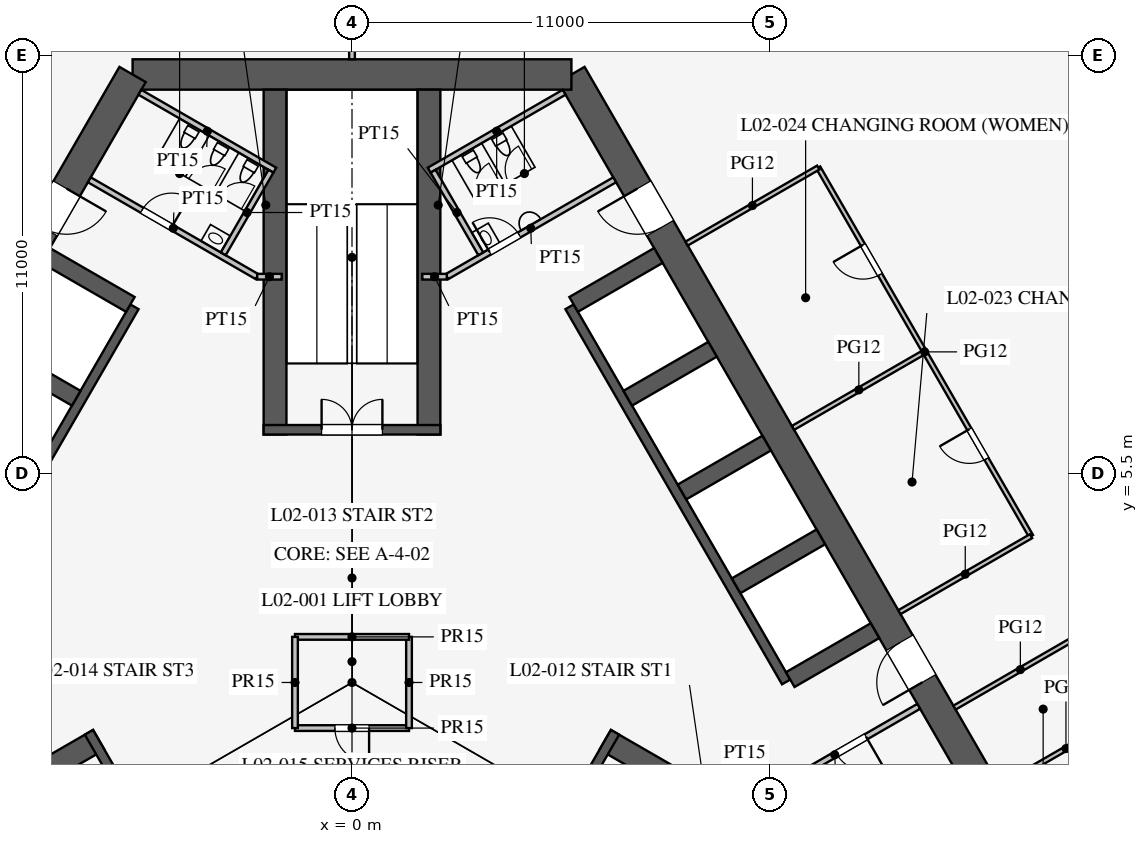
"""IFC4 building model, lengths in metres.
Left out: names, types, materials, properties, quantities, classifications, styles, units other than length and angle.
Written with IfcOpenShell. Run it as: python <this file> out.ifc"""

import sys

from ifc_helpers import new_model, si_unit, direction, frame, frame_2d, origin, place, context, subcontext, project, spatial, rectangle, extrude, element, fill, save


model = new_model("IFC4")
c1 = context("Model", 3, precision=1e-05, world=origin(), true_north=direction((0.0, 1.0)))
c2 = subcontext(c1, "Body", "Model", "MODEL_VIEW")
j1 = project(units=[si_unit("LENGTHUNIT", "METRE"), si_unit("PLANEANGLEUNIT", "RADIAN")], contexts=[c1])
p1 = place(None, origin())
s1 = spatial("IfcSite", under=j1, at=p1, CompositionType="ELEMENT")
p2 = place(p1, origin())
s2 = spatial("IfcBuilding", under=s1, at=p2, CompositionType="ELEMENT")
p3 = place(p2, frame((0.0, 0.0, 11.5)))
s3 = spatial("IfcBuildingStorey", under=s2, at=p3, CompositionType="ELEMENT", Elevation=11.5)
p4 = place(p3, frame((16.743, -3.0, 0.0), z_axis=(0.0, 0.0, 1.0), x_axis=(-0.500002442456, 0.866023993627, 0.0)))
e1 = element("IfcWall", 1, at=p4, inside=s3, PredefinedType="SHEAR", context=c2, shape_type="SweptSolid", body=[
    extrude(rectangle(XDim=21.939, YDim=0.8, at=frame_2d((10.97, 0.0))), origin(), (0.0, 0.0, 1.0), 5.0),
])
p5 = place(p4, frame((17.27, 0.0, 0.0)))
e2 = element("IfcOpeningElement", 2, at=p5, cuts=e1, PredefinedType="OPENING", context=c2, shape_type="SweptSolid", body=[
    extrude(rectangle(XDim=1.2, YDim=2.1, at=frame_2d((0.6, 1.05))), frame((0.0, 0.41, 0.0), z_axis=(0.0, -1.0, 0.0), x_axis=(1.0, 0.0, 0.0)), (0.0, 0.0, 1.0), 0.82),
])
p6 = place(p4, frame((3.47, 0.0, 0.0)))
e3 = element("IfcOpeningElement", 3, at=p6, cuts=e1, PredefinedType="OPENING", context=c2, shape_type="SweptSolid", body=[
    extrude(rectangle(XDim=1.2, YDim=2.1, at=frame_2d((0.6, 1.05))), frame((0.0, 0.41, 0.0), z_axis=(0.0, -1.0, 0.0), x_axis=(1.0, 0.0, 0.0)), (0.0, 0.0, 1.0), 0.82),
])
p7 = place(p3, frame((5.773, 16.0, 0.0), z_axis=(0.0, 0.0, 1.0), x_axis=(-1.0, 0.0, 0.0)))
e4 = element("IfcWall", 4, at=p7, inside=s3, PredefinedType="SHEAR", context=c2, shape_type="SweptSolid", body=[
    extrude(rectangle(XDim=11.547, YDim=0.8, at=frame_2d((5.773, 0.0))), origin(), (0.0, 0.0, 1.0), 5.0),
])
p8 = place(p3, frame((-5.773, 16.0, 0.0), z_axis=(0.0, 0.0, 1.0), x_axis=(-0.500002442456, -0.866023993627, 0.0)))
e5 = element("IfcWall", 5, at=p8, inside=s3, PredefinedType="SHEAR", context=c2, shape_type="SweptSolid", body=[
    extrude(rectangle(XDim=21.939, YDim=0.8, at=frame_2d((10.97, 0.0))), origin(), (0.0, 0.0, 1.0), 5.0),
])
p9 = place(p8, frame((17.27, 0.0, 0.0)))
e6 = element("IfcOpeningElement", 6, at=p9, cuts=e5, PredefinedType="OPENING", context=c2, shape_type="SweptSolid", body=[
    extrude(rectangle(XDim=1.2, YDim=2.1, at=frame_2d((0.6, 1.05))), frame((0.0, 0.41, 0.0), z_axis=(0.0, -1.0, 0.0), x_axis=(1.0, 0.0, 0.0)), (0.0, 0.0, 1.0), 0.82),
])
p10 = place(p8, frame((3.47, 0.0, 0.0)))
e7 = element("IfcOpeningElement", 7, at=p10, cuts=e5, PredefinedType="OPENING", context=c2, shape_type="SweptSolid", body=[
    extrude(rectangle(XDim=1.2, YDim=2.1, at=frame_2d((0.6, 1.05))), frame((0.0, 0.41, 0.0), z_axis=(0.0, -1.0, 0.0), x_axis=(1.0, 0.0, 0.0)), (0.0, 0.0, 1.0), 0.82),
])
p11 = place(p3, frame((11.424, 0.014, 0.0), z_axis=(0.0, 0.0, 1.0), x_axis=(-0.500001763848, 0.866024385424, 0.0)))
e8 = element("IfcWall", 8, at=p11, inside=s3, PredefinedType="SHEAR", context=c2, shape_type="SweptSolid", body=[
    extrude(rectangle(XDim=11.4, YDim=0.25, at=frame_2d((5.7, 0.0))), origin(), (0.0, 0.0, 1.0), 5.0),
])
for number, where, z_axis, x_axis in (
    (9, (11.532, 0.076, 0.0), (0.0, 0.0, 1.0), (0.866, 0.5, 0.0)),
    (10, (10.107, 2.544, 0.0), (0.0, 0.0, 1.0), (0.866, 0.5, 0.0)),
    (11, (8.682, 5.012, 0.0), (0.0, 0.0, 1.0), (0.866, 0.5, 0.0)),
    (12, (7.257, 7.481, 0.0), (0.0, 0.0, 1.0), (0.866, 0.5, 0.0)),
):
    element("IfcWall", number, at=place(p3, frame(where, z_axis=z_axis, x_axis=x_axis)), inside=s3, PredefinedType="SHEAR", context=c2, shape_type="SweptSolid", body=[
        extrude(rectangle(XDim=2.575, YDim=0.45, at=frame_2d((1.288, 0.0))), origin(), (0.0, 0.0, 1.0), 5.0),
    ])
p12 = place(p3, frame((5.832, 9.949, 0.0), z_axis=(0.0, 0.0, 1.0), x_axis=(0.866029291668, 0.499993265928, 0.0)))
e13 = element("IfcWall", 13, at=p12, inside=s3, PredefinedType="SHEAR", context=c2, shape_type="SweptSolid", body=[
    extrude(rectangle(XDim=2.575, YDim=0.45, at=frame_2d((1.288, 0.0))), origin(), (0.0, 0.0, 1.0), 5.0),
])
p13 = place(p3, frame((-5.724, 9.886, 0.0), z_axis=(0.0, 0.0, 1.0), x_axis=(-0.500001763848, -0.866024385424, 0.0)))
e14 = element("IfcWall", 14, at=p13, inside=s3, PredefinedType="SHEAR", context=c2, shape_type="SweptSolid", body=[
    extrude(rectangle(XDim=11.4, YDim=0.25, at=frame_2d((5.7, 0.0))), origin(), (0.0, 0.0, 1.0), 5.0),
])
p14 = place(p13, frame((6.525, 0.0, 0.0)))
e15 = element("IfcOpeningElement", 15, at=p14, cuts=e14, PredefinedType="OPENING", context=c2, shape_type="SweptSolid", body=[
    extrude(rectangle(XDim=1.2, YDim=2.2, at=frame_2d((0.6, 1.1))), frame((0.0, 0.135, 0.0), z_axis=(0.0, -1.0, 0.0), x_axis=(1.0, 0.0, 0.0)), (0.0, 0.0, 1.0), 0.27),
])
p15 = place(p13, frame((9.375, 0.0, 0.0)))
e16 = element("IfcOpeningElement", 16, at=p15, cuts=e14, PredefinedType="OPENING", context=c2, shape_type="SweptSolid", body=[
    extrude(rectangle(XDim=1.2, YDim=2.2, at=frame_2d((0.6, 1.1))), frame((0.0, 0.135, 0.0), z_axis=(0.0, -1.0, 0.0), x_axis=(1.0, 0.0, 0.0)), (0.0, 0.0, 1.0), 0.27),
])
p16 = place(p3, frame((-5.832, 9.949, 0.0), z_axis=(0.0, 0.0, 1.0), x_axis=(-0.866029291668, 0.499993265928, 0.0)))
e17 = element("IfcWall", 17, at=p16, inside=s3, PredefinedType="SHEAR", context=c2, shape_type="SweptSolid", body=[
    extrude(rectangle(XDim=2.575, YDim=0.45, at=frame_2d((1.288, 0.0))), origin(), (0.0, 0.0, 1.0), 5.0),
])
p17 = place(p3, frame((-7.257, 7.481, 0.0), z_axis=(0.0, 0.0, 1.0), x_axis=(-0.866046643894, 0.499963209246, 0.0)))
e18 = element("IfcWall", 18, at=p17, inside=s3, PredefinedType="SHEAR", context=c2, shape_type="SweptSolid", body=[
    extrude(rectangle(XDim=2.575, YDim=0.45, at=frame_2d((1.288, 0.0))), origin(), (0.0, 0.0, 1.0), 5.0),
])
p18 = place(p3, frame((6.663, -1.509, 0.0), z_axis=(0.0, 0.0, 1.0), x_axis=(0.866019375473, -0.500010441196, 0.0)))
e19 = element("IfcWall", 19, at=p18, inside=s3, PredefinedType="SHEAR", context=c2, shape_type="SweptSolid", body=[
    extrude(rectangle(XDim=9.075, YDim=0.6, at=frame_2d((4.538, 0.0))), origin(), (0.0, 0.0, 1.0), 5.0),
])
p19 = place(p3, frame((4.597, -5.339, 0.0), z_axis=(0.0, 0.0, 1.0), x_axis=(0.499984536904, 0.866034331223, 0.0)))
e20 = element("IfcWall", 20, at=p19, inside=s3, PredefinedType="SHEAR", context=c2, shape_type="SweptSolid", body=[
    extrude(rectangle(XDim=4.65, YDim=0.25, at=frame_2d((2.325, 0.0))), origin(), (0.0, 0.0, 1.0), 5.0),
])
p20 = place(p19, frame((1.525, 0.0, 0.0)))
e21 = element("IfcOpeningElement", 21, at=p20, cuts=e20, PredefinedType="OPENING", context=c2, shape_type="SweptSolid", body=[
    extrude(rectangle(XDim=1.6, YDim=2.1, at=frame_2d((0.8, 1.05))), frame((0.0, 0.135, 0.0), z_axis=(0.0, -1.0, 0.0), x_axis=(1.0, 0.0, 0.0)), (0.0, 0.0, 1.0), 0.27),
])
for number, where, z_axis, x_axis in (
    (22, (2.025, 6.525, 0.0), (0.0, 0.0, 1.0), (0.0, 1.0, 0.0)),
    (23, (-2.025, 6.525, 0.0), (0.0, 0.0, 1.0), (0.0, 1.0, 0.0)),
):
    element("IfcWall", number, at=place(p3, frame(where, z_axis=z_axis, x_axis=x_axis)), inside=s3, PredefinedType="SHEAR", context=c2, shape_type="SweptSolid", body=[
        extrude(rectangle(XDim=9.075, YDim=0.6, at=frame_2d((4.538, 0.0))), origin(), (0.0, 0.0, 1.0), 5.0),
    ])
p21 = place(p3, frame((2.325, 6.65, 0.0), z_axis=(0.0, 0.0, 1.0), x_axis=(-1.0, 0.0, 0.0)))
e24 = element("IfcWall", 24, at=p21, inside=s3, PredefinedType="SHEAR", context=c2, shape_type="SweptSolid", body=[
    extrude(rectangle(XDim=4.65, YDim=0.25, at=frame_2d((2.325, 0.0))), origin(), (0.0, 0.0, 1.0), 5.0),
])
p22 = place(p21, frame((1.525, 0.0, 0.0)))
e25 = element("IfcOpeningElement", 25, at=p22, cuts=e24, PredefinedType="OPENING", context=c2, shape_type="SweptSolid", body=[
    extrude(rectangle(XDim=1.6, YDim=2.1, at=frame_2d((0.8, 1.05))), frame((0.0, 0.135, 0.0), z_axis=(0.0, -1.0, 0.0), x_axis=(1.0, 0.0, 0.0)), (0.0, 0.0, 1.0), 0.27),
])
p23 = place(p3, frame((-6.663, -1.509, 0.0), z_axis=(0.0, 0.0, 1.0), x_axis=(-0.866019375473, -0.500010441196, 0.0)))
e26 = element("IfcWall", 26, at=p23, inside=s3, PredefinedType="SHEAR", context=c2, shape_type="SweptSolid", body=[
    extrude(rectangle(XDim=9.075, YDim=0.6, at=frame_2d((4.538, 0.0))), origin(), (0.0, 0.0, 1.0), 5.0),
])
p24 = place(p3, frame((-6.922, -1.312, 0.0), z_axis=(0.0, 0.0, 1.0), x_axis=(0.499984536904, -0.866034331223, 0.0)))
e27 = element("IfcWall", 27, at=p24, inside=s3, PredefinedType="SHEAR", context=c2, shape_type="SweptSolid", body=[
    extrude(rectangle(XDim=4.65, YDim=0.25, at=frame_2d((2.325, 0.0))), origin(), (0.0, 0.0, 1.0), 5.0),
])
p25 = place(p24, frame((1.525, 0.0, 0.0)))
e28 = element("IfcOpeningElement", 28, at=p25, cuts=e27, PredefinedType="OPENING", context=c2, shape_type="SweptSolid", body=[
    extrude(rectangle(XDim=1.6, YDim=2.1, at=frame_2d((0.8, 1.05))), frame((0.0, 0.135, 0.0), z_axis=(0.0, -1.0, 0.0), x_axis=(1.0, 0.0, 0.0)), (0.0, 0.0, 1.0), 0.27),
])
p26 = place(p3, frame((2.495, 10.678, 0.0), z_axis=(0.0, 0.0, 1.0), x_axis=(0.86602216432, 0.500005610874, 0.0)))
e29 = element("IfcWall", 29, at=p26, inside=s3, PredefinedType="PARTITIONING", context=c2, shape_type="SweptSolid", body=[
    extrude(rectangle(XDim=5.1, YDim=0.15, at=frame_2d((2.55, 0.0))), origin(), (0.0, 0.0, 1.0), 4.8),
])
p27 = place(p26, frame((1.3, 0.0, 0.0)))
e30 = element("IfcOpeningElement", 30, at=p27, cuts=e29, PredefinedType="OPENING", context=c2, shape_type="SweptSolid", body=[
    extrude(rectangle(XDim=0.9, YDim=2.1, at=frame_2d((0.45, 1.05))), frame((0.0, 0.085, 0.0), z_axis=(0.0, -1.0, 0.0), x_axis=(1.0, 0.0, 0.0)), (0.0, 0.0, 1.0), 0.17),
])
p28 = place(p3, frame((10.495, -3.178, 0.0), z_axis=(0.0, 0.0, 1.0), x_axis=(0.86602216432, 0.500005610874, 0.0)))
e31 = element("IfcWall", 31, at=p28, inside=s3, PredefinedType="PARTITIONING", context=c2, shape_type="SweptSolid", body=[
    extrude(rectangle(XDim=5.1, YDim=0.15, at=frame_2d((2.55, 0.0))), origin(), (0.0, 0.0, 1.0), 4.8),
])
p29 = place(p28, frame((2.6, 0.0, 0.0)))
e32 = element("IfcOpeningElement", 32, at=p29, cuts=e31, PredefinedType="OPENING", context=c2, shape_type="SweptSolid", body=[
    extrude(rectangle(XDim=0.9, YDim=2.1, at=frame_2d((0.45, 1.05))), frame((0.0, 0.085, 0.0), z_axis=(0.0, -1.0, 0.0), x_axis=(1.0, 0.0, 0.0)), (0.0, 0.0, 1.0), 0.17),
])
p30 = place(p3, frame((-2.495, 10.678, 0.0), z_axis=(0.0, 0.0, 1.0), x_axis=(-0.86602216432, 0.500005610874, 0.0)))
e33 = element("IfcWall", 33, at=p30, inside=s3, PredefinedType="PARTITIONING", context=c2, shape_type="SweptSolid", body=[
    extrude(rectangle(XDim=5.1, YDim=0.15, at=frame_2d((2.55, 0.0))), origin(), (0.0, 0.0, 1.0), 4.8),
])
p31 = place(p30, frame((2.6, 0.0, 0.0)))
e34 = element("IfcOpeningElement", 34, at=p31, cuts=e33, PredefinedType="OPENING", context=c2, shape_type="SweptSolid", body=[
    extrude(rectangle(XDim=0.9, YDim=2.1, at=frame_2d((0.45, 1.05))), frame((0.0, 0.085, 0.0), z_axis=(0.0, -1.0, 0.0), x_axis=(1.0, 0.0, 0.0)), (0.0, 0.0, 1.0), 0.17),
])
for number, where, z_axis, x_axis in (
    (35, (2.495, 10.678, 0.0), (0.0, 0.0, 1.0), (-1.0, 0.0, 0.0)),
    (36, (-2.495, 10.678, 0.0), (0.0, 0.0, 1.0), (1.0, 0.0, 0.0)),
):
    element("IfcWall", number, at=place(p3, frame(where, z_axis=z_axis, x_axis=x_axis)), inside=s3, PredefinedType="PARTITIONING", context=c2, shape_type="SweptSolid", body=[
        extrude(rectangle(XDim=0.645, YDim=0.15, at=frame_2d((0.323, 0.0))), origin(), (0.0, 0.0, 1.0), 4.8),
    ])
p32 = place(p3, frame((2.031, 13.482, 0.0), z_axis=(0.0, 0.0, 1.0), x_axis=(0.866050731258, 0.499956128963, 0.0)))
e37 = element("IfcWall", 37, at=p32, inside=s3, PredefinedType="PARTITIONING", context=c2, shape_type="SweptSolid", body=[
    extrude(rectangle(XDim=4.1, YDim=0.15, at=frame_2d((2.05, 0.0))), origin(), (0.0, 0.0, 1.0), 4.8),
])
p33 = place(p3, frame((3.389, 11.281, 0.0), z_axis=(0.0, 0.0, 1.0), x_axis=(-0.499989096993, 0.866031698547, 0.0)))
e38 = element("IfcWall", 38, at=p33, inside=s3, PredefinedType="PARTITIONING", context=c2, shape_type="SweptSolid", body=[
    extrude(rectangle(XDim=2.51, YDim=0.15, at=frame_2d((1.255, 0.0))), origin(), (0.0, 0.0, 1.0), 4.8),
])
p34 = place(p3, frame((-2.031, 13.482, 0.0), z_axis=(0.0, 0.0, 1.0), x_axis=(-0.866050731258, 0.499956128963, 0.0)))
e39 = element("IfcWall", 39, at=p34, inside=s3, PredefinedType="PARTITIONING", context=c2, shape_type="SweptSolid", body=[
    extrude(rectangle(XDim=4.1, YDim=0.15, at=frame_2d((2.05, 0.0))), origin(), (0.0, 0.0, 1.0), 4.8),
])
p35 = place(p3, frame((-3.389, 11.281, 0.0), z_axis=(0.0, 0.0, 1.0), x_axis=(0.499989096993, 0.866031698547, 0.0)))
e40 = element("IfcWall", 40, at=p35, inside=s3, PredefinedType="PARTITIONING", context=c2, shape_type="SweptSolid", body=[
    extrude(rectangle(XDim=2.51, YDim=0.15, at=frame_2d((1.255, 0.0))), origin(), (0.0, 0.0, 1.0), 4.8),
])
p36 = place(p3, frame((-1.5, -1.2, 0.0), z_axis=(0.0, 0.0, 1.0), x_axis=(1.0, 0.0, 0.0)))
e41 = element("IfcWall", 41, at=p36, inside=s3, PredefinedType="PARTITIONING", context=c2, shape_type="SweptSolid", body=[
    extrude(rectangle(XDim=3.0, YDim=0.15, at=frame_2d((1.5, 0.0))), origin(), (0.0, 0.0, 1.0), 4.8),
])
p37 = place(p36, frame((1.05, 0.0, 0.0)))
e42 = element("IfcOpeningElement", 42, at=p37, cuts=e41, PredefinedType="OPENING", context=c2, shape_type="SweptSolid", body=[
    extrude(rectangle(XDim=0.9, YDim=2.1, at=frame_2d((0.45, 1.05))), frame((0.0, 0.085, 0.0), z_axis=(0.0, -1.0, 0.0), x_axis=(1.0, 0.0, 0.0)), (0.0, 0.0, 1.0), 0.17),
])
p38 = place(p3, frame((1.5, -1.2, 0.0), z_axis=(0.0, 0.0, 1.0), x_axis=(0.0, 1.0, 0.0)))
e43 = element("IfcWall", 43, at=p38, inside=s3, PredefinedType="PARTITIONING", context=c2, shape_type="SweptSolid", body=[
    extrude(rectangle(XDim=2.4, YDim=0.15, at=frame_2d((1.2, 0.0))), origin(), (0.0, 0.0, 1.0), 4.8),
])
p39 = place(p3, frame((1.5, 1.2, 0.0), z_axis=(0.0, 0.0, 1.0), x_axis=(-1.0, 0.0, 0.0)))
e44 = element("IfcWall", 44, at=p39, inside=s3, PredefinedType="PARTITIONING", context=c2, shape_type="SweptSolid", body=[
    extrude(rectangle(XDim=3.0, YDim=0.15, at=frame_2d((1.5, 0.0))), origin(), (0.0, 0.0, 1.0), 4.8),
])
p40 = place(p3, frame((-1.5, 1.2, 0.0), z_axis=(0.0, 0.0, 1.0), x_axis=(0.0, -1.0, 0.0)))
e45 = element("IfcWall", 45, at=p40, inside=s3, PredefinedType="PARTITIONING", context=c2, shape_type="SweptSolid", body=[
    extrude(rectangle(XDim=2.4, YDim=0.15, at=frame_2d((1.2, 0.0))), origin(), (0.0, 0.0, 1.0), 4.8),
])
p41 = place(p3, frame((0.0, 16.4, 0.0), z_axis=(0.0, 0.0, 1.0), x_axis=(0.0, 1.0, 0.0)))
e46 = element("IfcWall", 46, at=p41, inside=s3, PredefinedType="PARTITIONING", context=c2, shape_type="SweptSolid", body=[
    extrude(rectangle(XDim=18.25, YDim=0.15, at=frame_2d((9.125, 0.0))), origin(), (0.0, 0.0, 1.0), 3.1),
])
p42 = place(p3, frame((15.069, 8.7, 0.0), z_axis=(0.0, 0.0, 1.0), x_axis=(-0.49999793692, 0.866026594901, 0.0)))
e47 = element("IfcWall", 47, at=p42, inside=s3, PredefinedType="PARTITIONING", context=c2, shape_type="SweptSolid", body=[
    extrude(rectangle(XDim=5.6, YDim=0.12, at=frame_2d((2.8, 0.0))), origin(), (0.0, 0.0, 1.0), 3.6),
])
p43 = place(p42, frame((2.35, 0.0, 0.0)))
e48 = element("IfcOpeningElement", 48, at=p43, cuts=e47, PredefinedType="OPENING", context=c2, shape_type="SweptSolid", body=[
    extrude(rectangle(XDim=0.9, YDim=2.1, at=frame_2d((0.45, 1.05))), frame((0.0, 0.07, 0.0), z_axis=(0.0, -1.0, 0.0), x_axis=(1.0, 0.0, 0.0)), (0.0, 0.0, 1.0), 0.14),
])
p44 = place(p3, frame((17.869, 3.85, 0.0), z_axis=(0.0, 0.0, 1.0), x_axis=(-0.500016814911, 0.866015695474, 0.0)))
e49 = element("IfcWall", 49, at=p44, inside=s3, PredefinedType="PARTITIONING", context=c2, shape_type="SweptSolid", body=[
    extrude(rectangle(XDim=5.6, YDim=0.12, at=frame_2d((2.8, 0.0))), origin(), (0.0, 0.0, 1.0), 3.6),
])
p45 = place(p44, frame((2.35, 0.0, 0.0)))
e50 = element("IfcOpeningElement", 50, at=p45, cuts=e49, PredefinedType="OPENING", context=c2, shape_type="SweptSolid", body=[
    extrude(rectangle(XDim=0.9, YDim=2.1, at=frame_2d((0.45, 1.05))), frame((0.0, 0.07, 0.0), z_axis=(0.0, -1.0, 0.0), x_axis=(1.0, 0.0, 0.0)), (0.0, 0.0, 1.0), 0.14),
])
for number, where, z_axis, x_axis in (
    (51, (8.805, 11.55, 0.0), (0.0, 0.0, 1.0), (0.866, 0.5, 0.0)),
    (52, (11.605, 6.7, 0.0), (0.0, 0.0, 1.0), (0.866, 0.5, 0.0)),
    (53, (17.055, -2.74, 0.0), (0.0, 0.0, 1.0), (0.866, 0.5, 0.0)),
    (54, (14.405, 1.85, 0.0), (0.0, 0.0, 1.0), (0.866, 0.5, 0.0)),
    (55, (15.855, -0.661, 0.0), (0.0, 0.0, 1.0), (0.866, 0.5, 0.0)),
):
    element("IfcWall", number, at=place(p3, frame(where, z_axis=z_axis, x_axis=x_axis)), inside=s3, PredefinedType="PARTITIONING", context=c2, shape_type="SweptSolid", body=[
        extrude(rectangle(XDim=4.0, YDim=0.12, at=frame_2d((2.0, 0.0))), origin(), (0.0, 0.0, 1.0), 3.6),
    ])
p46 = place(p27, origin())
e56 = element("IfcDoor", 56, at=p46, inside=s3, OperationType="SINGLE_SWING_LEFT", PredefinedType="DOOR", context=c2, shape_type="SweptSolid", body=[
    extrude(rectangle(XDim=0.9, YDim=2.1, at=frame_2d((0.45, 1.05))), frame((0.0, 0.025, 0.0), z_axis=(0.0, -1.0, 0.0), x_axis=(1.0, 0.0, 0.0)), (0.0, 0.0, 1.0), 0.05),
])
fill(e30, e56)
p47 = place(p29, frame((0.9, 0.0, 0.0), z_axis=(0.0, 0.0, 1.0), x_axis=(-1.0, 0.0, 0.0)))
e57 = element("IfcDoor", 57, at=p47, inside=s3, OperationType="SINGLE_SWING_LEFT", PredefinedType="DOOR", context=c2, shape_type="SweptSolid", body=[
    extrude(rectangle(XDim=0.9, YDim=2.1, at=frame_2d((0.45, 1.05))), frame((0.0, 0.025, 0.0), z_axis=(0.0, -1.0, 0.0), x_axis=(1.0, 0.0, 0.0)), (0.0, 0.0, 1.0), 0.05),
])
fill(e32, e57)
p48 = place(p31, frame((0.9, 0.0, 0.0), z_axis=(0.0, 0.0, 1.0), x_axis=(-1.0, 0.0, 0.0)))
e58 = element("IfcDoor", 58, at=p48, inside=s3, OperationType="SINGLE_SWING_RIGHT", PredefinedType="DOOR", context=c2, shape_type="SweptSolid", body=[
    extrude(rectangle(XDim=0.9, YDim=2.1, at=frame_2d((0.45, 1.05))), frame((0.0, 0.025, 0.0), z_axis=(0.0, -1.0, 0.0), x_axis=(1.0, 0.0, 0.0)), (0.0, 0.0, 1.0), 0.05),
])
fill(e34, e58)
p49 = place(p37, frame((0.9, 0.0, 0.0), z_axis=(0.0, 0.0, 1.0), x_axis=(-1.0, 0.0, 0.0)))
e59 = element("IfcDoor", 59, at=p49, inside=s3, OperationType="SINGLE_SWING_LEFT", PredefinedType="DOOR", context=c2, shape_type="SweptSolid", body=[
    extrude(rectangle(XDim=0.9, YDim=2.1, at=frame_2d((0.45, 1.05))), frame((0.0, 0.025, 0.0), z_axis=(0.0, -1.0, 0.0), x_axis=(1.0, 0.0, 0.0)), (0.0, 0.0, 1.0), 0.05),
])
fill(e42, e59)
p50 = place(p22, frame((1.6, 0.0, 0.0), z_axis=(0.0, 0.0, 1.0), x_axis=(-1.0, 0.0, 0.0)))
e60 = element("IfcDoor", 60, at=p50, inside=s3, OperationType="DOUBLE_DOOR_SINGLE_SWING", PredefinedType="DOOR", context=c2, shape_type="SweptSolid", body=[
    extrude(rectangle(XDim=1.6, YDim=2.1, at=frame_2d((0.8, 1.05))), frame((0.0, 0.025, 0.0), z_axis=(0.0, -1.0, 0.0), x_axis=(1.0, 0.0, 0.0)), (0.0, 0.0, 1.0), 0.05),
])
fill(e25, e60)
p51 = place(p5, origin())
e61 = element("IfcDoor", 61, at=p51, inside=s3, OperationType="SINGLE_SWING_RIGHT", PredefinedType="DOOR", context=c2, shape_type="SweptSolid", body=[
    extrude(rectangle(XDim=1.2, YDim=2.1, at=frame_2d((0.6, 1.05))), frame((0.0, 0.025, 0.0), z_axis=(0.0, -1.0, 0.0), x_axis=(1.0, 0.0, 0.0)), (0.0, 0.0, 1.0), 0.05),
])
fill(e2, e61)
p52 = place(p6, origin())
e62 = element("IfcDoor", 62, at=p52, inside=s3, OperationType="SINGLE_SWING_LEFT", PredefinedType="DOOR", context=c2, shape_type="SweptSolid", body=[
    extrude(rectangle(XDim=1.2, YDim=2.1, at=frame_2d((0.6, 1.05))), frame((0.0, 0.025, 0.0), z_axis=(0.0, -1.0, 0.0), x_axis=(1.0, 0.0, 0.0)), (0.0, 0.0, 1.0), 0.05),
])
fill(e3, e62)
p53 = place(p10, origin())
e63 = element("IfcDoor", 63, at=p53, inside=s3, OperationType="SINGLE_SWING_LEFT", PredefinedType="DOOR", context=c2, shape_type="SweptSolid", body=[
    extrude(rectangle(XDim=1.2, YDim=2.1, at=frame_2d((0.6, 1.05))), frame((0.0, 0.025, 0.0), z_axis=(0.0, -1.0, 0.0), x_axis=(1.0, 0.0, 0.0)), (0.0, 0.0, 1.0), 0.05),
])
fill(e7, e63)
p54 = place(p45, origin())
e64 = element("IfcDoor", 64, at=p54, inside=s3, OperationType="SINGLE_SWING_RIGHT", PredefinedType="DOOR", context=c2, shape_type="SweptSolid", body=[
    extrude(rectangle(XDim=0.9, YDim=2.1, at=frame_2d((0.45, 1.05))), frame((0.0, 0.025, 0.0), z_axis=(0.0, -1.0, 0.0), x_axis=(1.0, 0.0, 0.0)), (0.0, 0.0, 1.0), 0.05),
])
fill(e50, e64)
p55 = place(p43, origin())
e65 = element("IfcDoor", 65, at=p55, inside=s3, OperationType="SINGLE_SWING_RIGHT", PredefinedType="DOOR", context=c2, shape_type="SweptSolid", body=[
    extrude(rectangle(XDim=0.9, YDim=2.1, at=frame_2d((0.45, 1.05))), frame((0.0, 0.025, 0.0), z_axis=(0.0, -1.0, 0.0), x_axis=(1.0, 0.0, 0.0)), (0.0, 0.0, 1.0), 0.05),
])
fill(e48, e65)
save(model, sys.argv[1])
